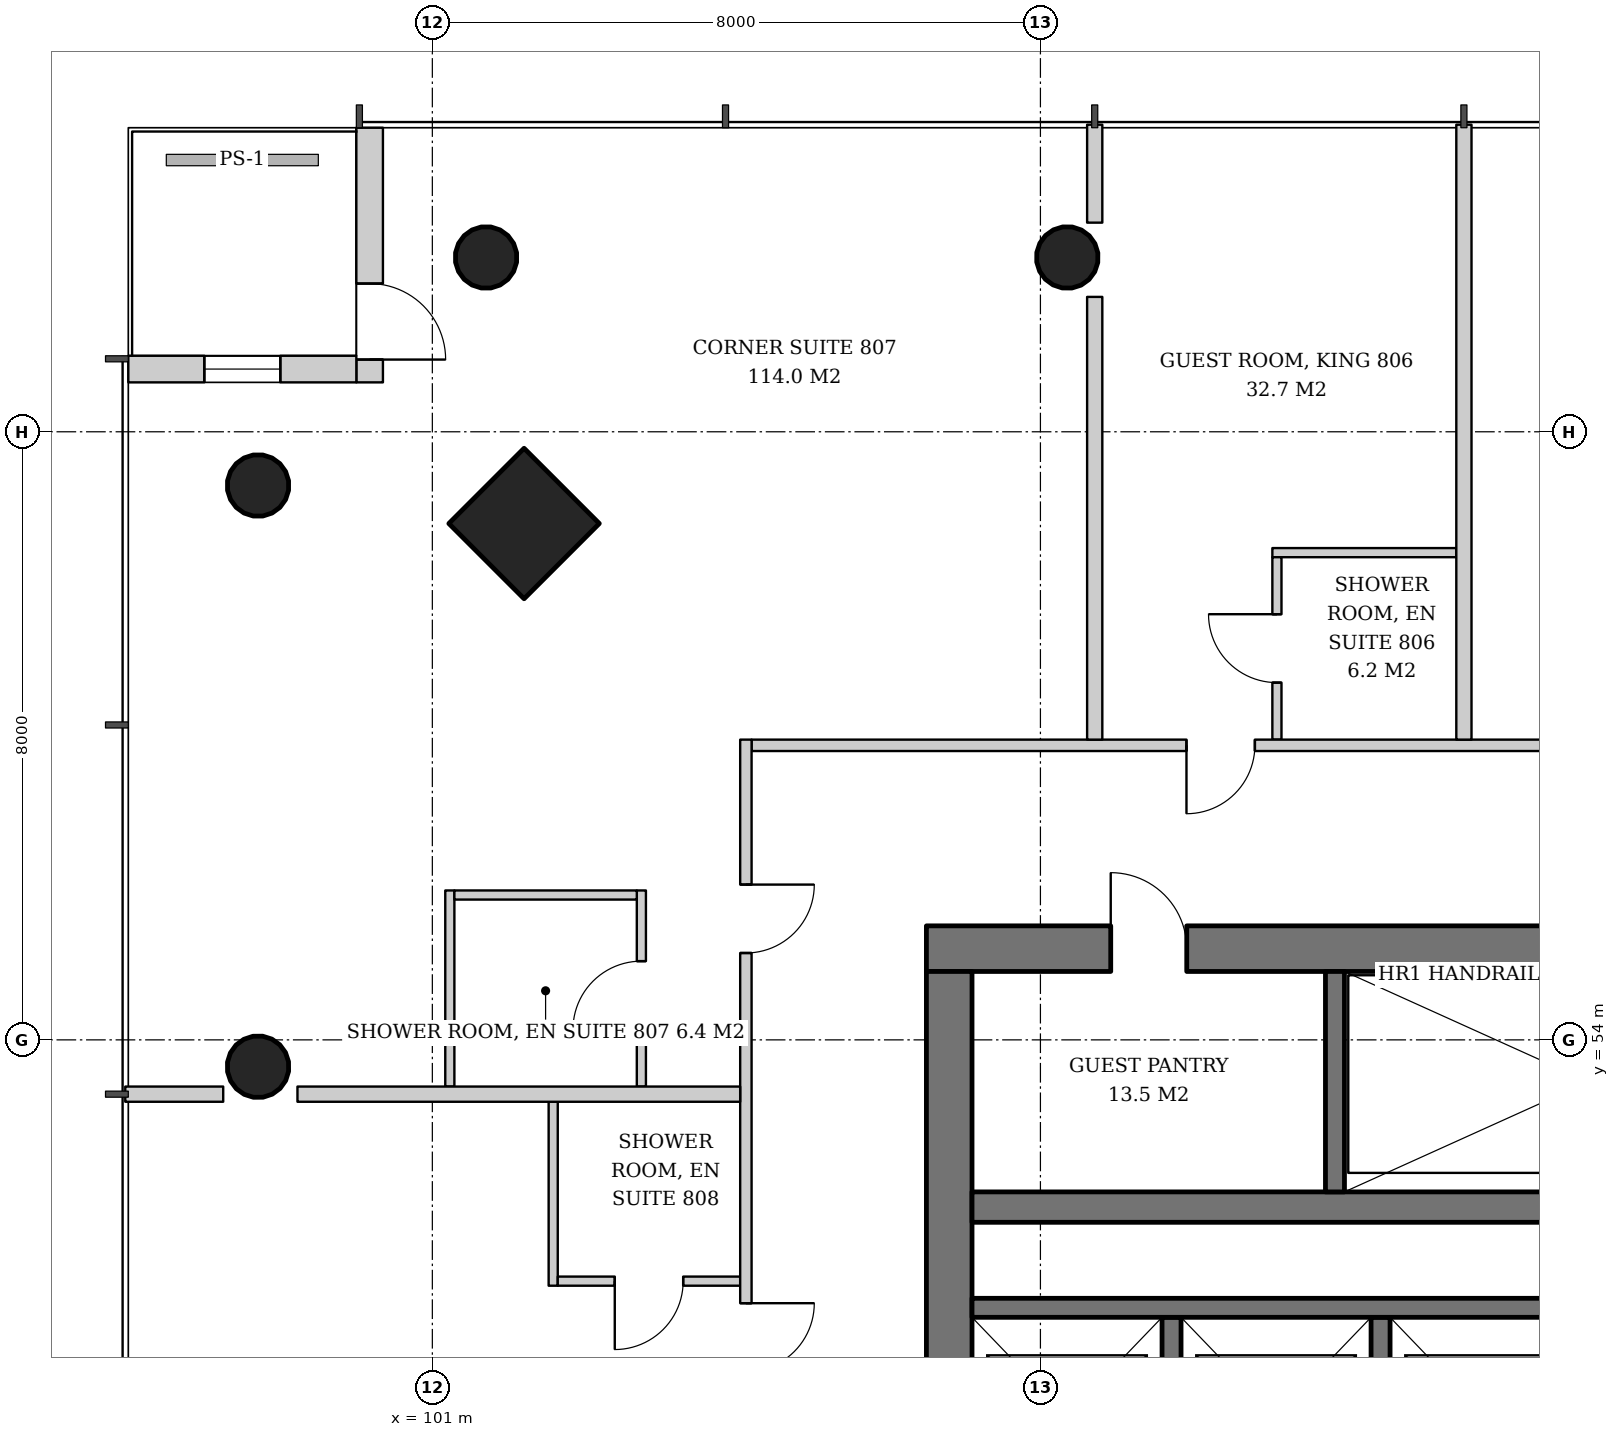
"""IFC4 building model, lengths in metres.
Left out: names, types, materials, properties, quantities, classifications, styles, units other than length and angle.
Written with IfcOpenShell. Run it as: python <this file> out.ifc"""

import sys

from ifc_helpers import new_model, si_unit, direction, frame, frame_2d, origin, origin_2d, place, context, subcontext, project, spatial, rectangle, hollow_circle, extrude, element, fill, save


model = new_model("IFC4")
c1 = context("Model", 3, precision=1e-05, world=origin(), true_north=direction((0.0, 1.0)))
c2 = subcontext(c1, "Body", "Model", "MODEL_VIEW")
j1 = project(units=[si_unit("LENGTHUNIT", "METRE"), si_unit("PLANEANGLEUNIT", "RADIAN")], contexts=[c1])
p1 = place(None, origin())
s1 = spatial("IfcSite", under=j1, at=p1, CompositionType="ELEMENT")
p2 = place(p1, origin())
s2 = spatial("IfcBuilding", under=s1, at=p2, CompositionType="ELEMENT")
p3 = place(p2, frame((0.0, 0.0, 36.2)))
s3 = spatial("IfcBuildingStorey", under=s2, at=p3, CompositionType="ELEMENT", Elevation=36.2)
p4 = place(p3, frame((102.155, 60.845, 0.0), z_axis=(0.042965756413, -0.042965756413, 0.998152236661), x_axis=(0.707106781187, 0.707106781187, 0.0)))
e1 = element("IfcColumn", 1, at=p4, inside=s3, PredefinedType="COLUMN", context=c2, shape_type="SweptSolid", body=[
    extrude(rectangle(XDim=1.4, YDim=1.4, at=origin_2d()), origin(), (0.0, 0.0, 1.0), 3.807),
])
p5 = place(p3, frame((101.655, 64.345, 0.0), z_axis=(0.042965756413, -0.042965756413, 0.998152236661), x_axis=(0.707106781187, 0.707106781187, 0.0)))
e2 = element("IfcColumn", 2, at=p5, inside=s3, PredefinedType="COLUMN", context=c2, shape_type="SweptSolid", body=[
    extrude(hollow_circle(Radius=0.406, WallThickness=0.03, at=origin_2d()), origin(), (0.0, 0.0, 1.0), 3.807),
])
p6 = place(p3, frame((109.328, 64.345, 0.0), z_axis=(0.021497765643, -0.042995531285, 0.998843946952), x_axis=(0.894427191, 0.4472135955, 0.0)))
e3 = element("IfcColumn", 3, at=p6, inside=s3, PredefinedType="COLUMN", context=c2, shape_type="SweptSolid", body=[
    extrude(hollow_circle(Radius=0.406, WallThickness=0.03, at=origin_2d()), origin(), (0.0, 0.0, 1.0), 3.804),
])
p7 = place(p3, frame((98.655, 61.345, 0.0), z_axis=(0.042965756413, -0.042965756413, 0.998152236661), x_axis=(0.707106781187, 0.707106781187, 0.0)))
e4 = element("IfcColumn", 4, at=p7, inside=s3, PredefinedType="COLUMN", context=c2, shape_type="SweptSolid", body=[
    extrude(hollow_circle(Radius=0.406, WallThickness=0.03, at=origin_2d()), origin(), (0.0, 0.0, 1.0), 3.807),
])
p8 = place(p3, frame((98.655, 53.672, 0.0), z_axis=(0.042995531285, -0.021497765643, 0.998843946952), x_axis=(0.4472135955, 0.894427191, 0.0)))
e5 = element("IfcColumn", 5, at=p8, inside=s3, PredefinedType="COLUMN", context=c2, shape_type="SweptSolid", body=[
    extrude(hollow_circle(Radius=0.406, WallThickness=0.03, at=origin_2d()), origin(), (0.0, 0.0, 1.0), 3.804),
])
p9 = place(p3, frame((107.5, 55.2, 0.0), z_axis=(0.0, 0.0, 1.0), x_axis=(1.0, 0.0, 0.0)))
e6 = element("IfcWall", 6, at=p9, inside=s3, PredefinedType="SHEAR", context=c2, shape_type="SweptSolid", body=[
    extrude(rectangle(XDim=19.0, YDim=0.6, at=frame_2d((9.5, 0.0))), origin(), (0.0, 0.0, 1.0), 3.8),
])
p10 = place(p9, frame((14.14, 0.0, 0.0)))
e7 = element("IfcOpeningElement", 7, at=p10, cuts=e6, PredefinedType="OPENING", context=c2, shape_type="SweptSolid", body=[
    extrude(rectangle(XDim=1.0, YDim=2.1, at=frame_2d((0.5, 1.05))), frame((0.0, 0.31, 0.0), z_axis=(0.0, -1.0, 0.0), x_axis=(1.0, 0.0, 0.0)), (0.0, 0.0, 1.0), 0.62),
])
p11 = place(p9, frame((2.425, 0.0, 0.0)))
e8 = element("IfcOpeningElement", 8, at=p11, cuts=e6, PredefinedType="OPENING", context=c2, shape_type="SweptSolid", body=[
    extrude(rectangle(XDim=1.0, YDim=2.1, at=frame_2d((0.5, 1.05))), frame((0.0, 0.31, 0.0), z_axis=(0.0, -1.0, 0.0), x_axis=(1.0, 0.0, 0.0)), (0.0, 0.0, 1.0), 0.62),
])
p12 = place(p3, frame((107.8, 37.1, 0.0), z_axis=(0.0, 0.0, 1.0), x_axis=(0.0, 1.0, 0.0)))
e9 = element("IfcWall", 9, at=p12, inside=s3, PredefinedType="SHEAR", context=c2, shape_type="SweptSolid", body=[
    extrude(rectangle(XDim=17.8, YDim=0.6, at=frame_2d((8.9, 0.0))), origin(), (0.0, 0.0, 1.0), 3.8),
])
p13 = place(p12, frame((8.0, 0.0, 0.0)))
e10 = element("IfcOpeningElement", 10, at=p13, cuts=e9, PredefinedType="OPENING", context=c2, shape_type="SweptSolid", body=[
    extrude(rectangle(XDim=1.8, YDim=2.4, at=frame_2d((0.9, 1.2))), frame((0.0, 0.31, 0.0), z_axis=(0.0, -1.0, 0.0), x_axis=(1.0, 0.0, 0.0)), (0.0, 0.0, 1.0), 0.62),
])
p14 = place(p3, frame((108.1, 51.8, 0.0), z_axis=(0.0, 0.0, 1.0), x_axis=(1.0, 0.0, 0.0)))
e11 = element("IfcWall", 11, at=p14, inside=s3, PredefinedType="SHEAR", context=c2, shape_type="SweptSolid", body=[
    extrude(rectangle(XDim=17.8, YDim=0.4, at=frame_2d((8.9, 0.0))), origin(), (0.0, 0.0, 1.0), 3.8),
])
p15 = place(p3, frame((100.175, 66.0, 0.0), z_axis=(0.0, 0.0, 1.0), x_axis=(0.0, -1.0, 0.0)))
e12 = element("IfcWall", 12, at=p15, inside=s3, PredefinedType="SOLIDWALL", context=c2, shape_type="SweptSolid", body=[
    extrude(rectangle(XDim=3.35, YDim=0.35, at=frame_2d((1.675, 0.0))), origin(), (0.0, 0.0, 1.0), 3.6),
])
p16 = place(p15, frame((2.05, 0.0, 0.0)))
e13 = element("IfcOpeningElement", 13, at=p16, cuts=e12, PredefinedType="OPENING", context=c2, shape_type="SweptSolid", body=[
    extrude(rectangle(XDim=1.0, YDim=2.4, at=frame_2d((0.5, 1.2))), frame((0.0, 0.185, 0.0), z_axis=(0.0, -1.0, 0.0), x_axis=(1.0, 0.0, 0.0)), (0.0, 0.0, 1.0), 0.37),
])
p17 = place(p3, frame((100.0, 62.825, 0.0), z_axis=(0.0, 0.0, 1.0), x_axis=(-1.0, 0.0, 0.0)))
e14 = element("IfcWall", 14, at=p17, inside=s3, PredefinedType="SOLIDWALL", context=c2, shape_type="SweptSolid", body=[
    extrude(rectangle(XDim=3.0, YDim=0.35, at=frame_2d((1.5, 0.0))), origin(), (0.0, 0.0, 1.0), 3.6),
])
p18 = place(p17, frame((1.0, 0.0, 0.9)))
e15 = element("IfcOpeningElement", 15, at=p18, cuts=e14, PredefinedType="OPENING", context=c2, shape_type="SweptSolid", body=[
    extrude(rectangle(XDim=1.0, YDim=2.4, at=frame_2d((0.5, 1.2))), frame((0.0, 0.185, 0.0), z_axis=(0.0, -1.0, 0.0), x_axis=(1.0, 0.0, 0.0)), (0.0, 0.0, 1.0), 0.37),
])
p19 = place(p3, frame((112.875, 52.0, 0.0), z_axis=(0.0, 0.0, 1.0), x_axis=(0.0, 1.0, 0.0)))
e16 = element("IfcWall", 16, at=p19, inside=s3, PredefinedType="SHEAR", context=c2, shape_type="SweptSolid", body=[
    extrude(rectangle(XDim=2.9, YDim=0.25, at=frame_2d((1.45, 0.0))), origin(), (0.0, 0.0, 1.0), 3.8),
])
for number, where, z_axis, x_axis in (
    (17, (110.725, 47.75, 0.0), (0.0, 0.0, 1.0), (0.0, 1.0, 0.0)),
    (18, (113.475, 47.75, 0.0), (0.0, 0.0, 1.0), (0.0, 1.0, 0.0)),
):
    element("IfcWall", number, at=place(p3, frame(where, z_axis=z_axis, x_axis=x_axis)), inside=s3, PredefinedType="SHEAR", context=c2, shape_type="SweptSolid", body=[
        extrude(rectangle(XDim=2.6, YDim=0.25, at=frame_2d((1.3, 0.0))), origin(), (0.0, 0.0, 1.0), 3.8),
    ])
p20 = place(p3, frame((108.1, 50.475, 0.0), z_axis=(0.0, 0.0, 1.0), x_axis=(1.0, 0.0, 0.0)))
e19 = element("IfcWall", 19, at=p20, inside=s3, PredefinedType="SHEAR", context=c2, shape_type="SweptSolid", body=[
    extrude(rectangle(XDim=11.0, YDim=0.25, at=frame_2d((5.5, 0.0))), origin(), (0.0, 0.0, 1.0), 3.8),
])
p21 = place(p3, frame((114.471, 60.41, 0.0), z_axis=(0.0, 0.0, 1.0), x_axis=(-1.0, 0.0, 0.0)))
e20 = element("IfcWall", 20, at=p21, inside=s3, PredefinedType="PARTITIONING", context=c2, shape_type="SweptSolid", body=[
    extrude(rectangle(XDim=2.42, YDim=0.12, at=frame_2d((1.21, 0.0))), origin(), (0.0, 0.0, 1.0), 2.847),
])
p22 = place(p3, frame((112.111, 57.95, 0.0), z_axis=(0.0, 0.0, 1.0), x_axis=(0.0, 1.0, 0.0)))
e21 = element("IfcWall", 21, at=p22, inside=s3, PredefinedType="PARTITIONING", context=c2, shape_type="SweptSolid", body=[
    extrude(rectangle(XDim=2.4, YDim=0.12, at=frame_2d((1.2, 0.0))), origin(), (0.0, 0.0, 1.0), 3.6),
])
p23 = place(p22, frame((0.75, 0.0, 0.0)))
e22 = element("IfcOpeningElement", 22, at=p23, cuts=e21, PredefinedType="OPENING", context=c2, shape_type="SweptSolid", body=[
    extrude(rectangle(XDim=0.9, YDim=2.1, at=frame_2d((0.45, 1.05))), frame((0.0, 0.07, 0.0), z_axis=(0.0, -1.0, 0.0), x_axis=(1.0, 0.0, 0.0)), (0.0, 0.0, 1.0), 0.14),
])
p24 = place(p3, frame((128.95, 57.875, 0.0), z_axis=(0.0, 0.0, 1.0), x_axis=(-1.0, 0.0, 0.0)))
e23 = element("IfcWall", 23, at=p24, inside=s3, PredefinedType="PARTITIONING", context=c2, shape_type="SweptSolid", body=[
    extrude(rectangle(XDim=23.75, YDim=0.15, at=frame_2d((11.875, 0.0))), origin(), (0.0, 0.0, 1.0), 2.8),
])
p25 = place(p24, frame((1.907, 0.0, 0.0)))
e24 = element("IfcOpeningElement", 24, at=p25, cuts=e23, PredefinedType="OPENING", context=c2, shape_type="SweptSolid", body=[
    extrude(rectangle(XDim=0.9, YDim=2.1, at=frame_2d((0.45, 1.05))), frame((0.0, 0.085, 0.0), z_axis=(0.0, -1.0, 0.0), x_axis=(1.0, 0.0, 0.0)), (0.0, 0.0, 1.0), 0.17),
])
p26 = place(p24, frame((7.414, 0.0, 0.0)))
e25 = element("IfcOpeningElement", 25, at=p26, cuts=e23, PredefinedType="OPENING", context=c2, shape_type="SweptSolid", body=[
    extrude(rectangle(XDim=0.9, YDim=2.1, at=frame_2d((0.45, 1.05))), frame((0.0, 0.085, 0.0), z_axis=(0.0, -1.0, 0.0), x_axis=(1.0, 0.0, 0.0)), (0.0, 0.0, 1.0), 0.17),
])
p27 = place(p24, frame((17.129, 0.0, 0.0)))
e26 = element("IfcOpeningElement", 26, at=p27, cuts=e23, PredefinedType="OPENING", context=c2, shape_type="SweptSolid", body=[
    extrude(rectangle(XDim=0.9, YDim=2.1, at=frame_2d((0.45, 1.05))), frame((0.0, 0.085, 0.0), z_axis=(0.0, -1.0, 0.0), x_axis=(1.0, 0.0, 0.0)), (0.0, 0.0, 1.0), 0.17),
])
p28 = place(p3, frame((114.572, 57.95, 0.0), z_axis=(0.0, 0.0, 1.0), x_axis=(0.0, 1.0, 0.0)))
e27 = element("IfcWall", 27, at=p28, inside=s3, PredefinedType="PARTITIONING", context=c2, shape_type="SweptSolid", body=[
    extrude(rectangle(XDim=8.09, YDim=0.2, at=frame_2d((4.045, 0.0))), origin(), (0.0, 0.0, 1.0), 2.847),
])
p29 = place(p3, frame((109.714, 57.95, 0.0), z_axis=(0.0, 0.0, 1.0), x_axis=(0.0, 1.0, 0.0)))
e28 = element("IfcWall", 28, at=p29, inside=s3, PredefinedType="PARTITIONING", context=c2, shape_type="SweptSolid", body=[
    extrude(rectangle(XDim=5.824, YDim=0.2, at=frame_2d((2.912, 0.0))), origin(), (0.0, 0.0, 1.0), 3.6),
])
p30 = place(p3, frame((109.714, 64.751, 0.0), z_axis=(0.0, 0.0, 1.0), x_axis=(0.0, 1.0, 0.0)))
e29 = element("IfcWall", 29, at=p30, inside=s3, PredefinedType="PARTITIONING", context=c2, shape_type="SweptSolid", body=[
    extrude(rectangle(XDim=1.289, YDim=0.2, at=frame_2d((0.645, 0.0))), origin(), (0.0, 0.0, 1.0), 3.6),
])
p31 = place(p3, frame((103.75, 53.386, 0.0), z_axis=(0.0, 0.0, 1.0), x_axis=(0.0, 1.0, 0.0)))
e30 = element("IfcWall", 30, at=p31, inside=s3, PredefinedType="PARTITIONING", context=c2, shape_type="SweptSolid", body=[
    extrude(rectangle(XDim=2.58, YDim=0.12, at=frame_2d((1.29, 0.0))), origin(), (0.0, 0.0, 1.0), 2.8),
])
p32 = place(p31, frame((0.75, 0.0, 0.0)))
e31 = element("IfcOpeningElement", 31, at=p32, cuts=e30, PredefinedType="OPENING", context=c2, shape_type="SweptSolid", body=[
    extrude(rectangle(XDim=0.9, YDim=2.1, at=frame_2d((0.45, 1.05))), frame((0.0, 0.07, 0.0), z_axis=(0.0, -1.0, 0.0), x_axis=(1.0, 0.0, 0.0)), (0.0, 0.0, 1.0), 0.14),
])
p33 = place(p3, frame((101.23, 53.386, 0.0), z_axis=(0.0, 0.0, 1.0), x_axis=(0.0, 1.0, 0.0)))
e32 = element("IfcWall", 32, at=p33, inside=s3, PredefinedType="PARTITIONING", context=c2, shape_type="SweptSolid", body=[
    extrude(rectangle(XDim=2.58, YDim=0.12, at=frame_2d((1.29, 0.0))), origin(), (0.0, 0.0, 1.0), 2.8),
])
p34 = place(p3, frame((103.69, 55.906, 0.0), z_axis=(0.0, 0.0, 1.0), x_axis=(-1.0, 0.0, 0.0)))
e33 = element("IfcWall", 33, at=p34, inside=s3, PredefinedType="PARTITIONING", context=c2, shape_type="SweptSolid", body=[
    extrude(rectangle(XDim=2.4, YDim=0.12, at=frame_2d((1.2, 0.0))), origin(), (0.0, 0.0, 1.0), 2.847),
])
p35 = place(p3, frame((102.59, 53.186, 0.0), z_axis=(0.0, 0.0, 1.0), x_axis=(0.0, -1.0, 0.0)))
e34 = element("IfcWall", 34, at=p35, inside=s3, PredefinedType="PARTITIONING", context=c2, shape_type="SweptSolid", body=[
    extrude(rectangle(XDim=2.42, YDim=0.12, at=frame_2d((1.21, 0.0))), origin(), (0.0, 0.0, 1.0), 2.847),
])
p36 = place(p3, frame((105.05, 50.826, 0.0), z_axis=(0.0, 0.0, 1.0), x_axis=(-1.0, 0.0, 0.0)))
e35 = element("IfcWall", 35, at=p36, inside=s3, PredefinedType="PARTITIONING", context=c2, shape_type="SweptSolid", body=[
    extrude(rectangle(XDim=2.4, YDim=0.12, at=frame_2d((1.2, 0.0))), origin(), (0.0, 0.0, 1.0), 3.6),
])
p37 = place(p36, frame((0.75, 0.0, 0.0)))
e36 = element("IfcOpeningElement", 36, at=p37, cuts=e35, PredefinedType="OPENING", context=c2, shape_type="SweptSolid", body=[
    extrude(rectangle(XDim=0.9, YDim=2.1, at=frame_2d((0.45, 1.05))), frame((0.0, 0.07, 0.0), z_axis=(0.0, -1.0, 0.0), x_axis=(1.0, 0.0, 0.0)), (0.0, 0.0, 1.0), 0.14),
])
p38 = place(p3, frame((105.125, 57.95, 0.0), z_axis=(0.0, 0.0, 1.0), x_axis=(0.0, -1.0, 0.0)))
e37 = element("IfcWall", 37, at=p38, inside=s3, PredefinedType="PARTITIONING", context=c2, shape_type="SweptSolid", body=[
    extrude(rectangle(XDim=23.75, YDim=0.15, at=frame_2d((11.875, 0.0))), origin(), (0.0, 0.0, 1.0), 2.8),
])
p39 = place(p38, frame((1.907, 0.0, 0.0)))
e38 = element("IfcOpeningElement", 38, at=p39, cuts=e37, PredefinedType="OPENING", context=c2, shape_type="SweptSolid", body=[
    extrude(rectangle(XDim=0.9, YDim=2.1, at=frame_2d((0.45, 1.05))), frame((0.0, 0.085, 0.0), z_axis=(0.0, -1.0, 0.0), x_axis=(1.0, 0.0, 0.0)), (0.0, 0.0, 1.0), 0.17),
])
p40 = place(p38, frame((7.414, 0.0, 0.0)))
e39 = element("IfcOpeningElement", 39, at=p40, cuts=e37, PredefinedType="OPENING", context=c2, shape_type="SweptSolid", body=[
    extrude(rectangle(XDim=0.9, YDim=2.1, at=frame_2d((0.45, 1.05))), frame((0.0, 0.085, 0.0), z_axis=(0.0, -1.0, 0.0), x_axis=(1.0, 0.0, 0.0)), (0.0, 0.0, 1.0), 0.17),
])
p41 = place(p38, frame((17.079, 0.0, 0.0)))
e40 = element("IfcOpeningElement", 40, at=p41, cuts=e37, PredefinedType="OPENING", context=c2, shape_type="SweptSolid", body=[
    extrude(rectangle(XDim=1.0, YDim=2.1, at=frame_2d((0.5, 1.05))), frame((0.0, 0.085, 0.0), z_axis=(0.0, -1.0, 0.0), x_axis=(1.0, 0.0, 0.0)), (0.0, 0.0, 1.0), 0.17),
])
p42 = place(p3, frame((105.05, 53.286, 0.0), z_axis=(0.0, 0.0, 1.0), x_axis=(-1.0, 0.0, 0.0)))
e41 = element("IfcWall", 41, at=p42, inside=s3, PredefinedType="PARTITIONING", context=c2, shape_type="SweptSolid", body=[
    extrude(rectangle(XDim=5.824, YDim=0.2, at=frame_2d((2.912, 0.0))), origin(), (0.0, 0.0, 1.0), 3.6),
])
p43 = place(p3, frame((98.249, 53.286, 0.0), z_axis=(0.0, 0.0, 1.0), x_axis=(-1.0, 0.0, 0.0)))
e42 = element("IfcWall", 42, at=p43, inside=s3, PredefinedType="PARTITIONING", context=c2, shape_type="SweptSolid", body=[
    extrude(rectangle(XDim=1.289, YDim=0.2, at=frame_2d((0.645, 0.0))), origin(), (0.0, 0.0, 1.0), 3.6),
])
p44 = place(p16, origin())
e43 = element("IfcDoor", 43, at=p44, inside=s3, OperationType="SINGLE_SWING_RIGHT", PredefinedType="DOOR", context=c2, shape_type="SweptSolid", body=[
    extrude(rectangle(XDim=1.0, YDim=2.4, at=frame_2d((0.5, 1.2))), frame((0.0, 0.025, 0.0), z_axis=(0.0, -1.0, 0.0), x_axis=(1.0, 0.0, 0.0)), (0.0, 0.0, 1.0), 0.05),
])
fill(e13, e43)
p45 = place(p18, origin())
e44 = element("IfcWindow", 44, at=p45, inside=s3, PartitioningType="SINGLE_PANEL", PredefinedType="WINDOW", context=c2, shape_type="SweptSolid", body=[
    extrude(rectangle(XDim=1.0, YDim=2.4, at=frame_2d((0.5, 1.2))), frame((0.0, 0.03, 0.0), z_axis=(0.0, -1.0, 0.0), x_axis=(1.0, 0.0, 0.0)), (0.0, 0.0, 1.0), 0.06),
])
fill(e15, e44)
p46 = place(p11, origin())
e45 = element("IfcDoor", 45, at=p46, inside=s3, OperationType="SINGLE_SWING_LEFT", PredefinedType="DOOR", context=c2, shape_type="SweptSolid", body=[
    extrude(rectangle(XDim=1.0, YDim=2.1, at=frame_2d((0.5, 1.05))), frame((0.0, -0.24, 0.0), z_axis=(0.0, -1.0, 0.0), x_axis=(1.0, 0.0, 0.0)), (0.0, 0.0, 1.0), 0.05),
])
fill(e8, e45)
p47 = place(p23, origin())
e46 = element("IfcDoor", 46, at=p47, inside=s3, OperationType="SINGLE_SWING_RIGHT", PredefinedType="DOOR", context=c2, shape_type="SweptSolid", body=[
    extrude(rectangle(XDim=0.9, YDim=2.1, at=frame_2d((0.45, 1.05))), frame((0.0, 0.025, 0.0), z_axis=(0.0, -1.0, 0.0), x_axis=(1.0, 0.0, 0.0)), (0.0, 0.0, 1.0), 0.05),
])
fill(e22, e46)
p48 = place(p27, origin())
e47 = element("IfcDoor", 47, at=p48, inside=s3, OperationType="SINGLE_SWING_RIGHT", PredefinedType="DOOR", context=c2, shape_type="SweptSolid", body=[
    extrude(rectangle(XDim=0.9, YDim=2.1, at=frame_2d((0.45, 1.05))), frame((0.0, 0.025, 0.0), z_axis=(0.0, -1.0, 0.0), x_axis=(1.0, 0.0, 0.0)), (0.0, 0.0, 1.0), 0.05),
])
fill(e26, e47)
p49 = place(p32, origin())
e48 = element("IfcDoor", 48, at=p49, inside=s3, OperationType="SINGLE_SWING_LEFT", PredefinedType="DOOR", context=c2, shape_type="SweptSolid", body=[
    extrude(rectangle(XDim=0.9, YDim=2.1, at=frame_2d((0.45, 1.05))), frame((0.0, 0.025, 0.0), z_axis=(0.0, -1.0, 0.0), x_axis=(1.0, 0.0, 0.0)), (0.0, 0.0, 1.0), 0.05),
])
fill(e31, e48)
p50 = place(p37, origin())
e49 = element("IfcDoor", 49, at=p50, inside=s3, OperationType="SINGLE_SWING_RIGHT", PredefinedType="DOOR", context=c2, shape_type="SweptSolid", body=[
    extrude(rectangle(XDim=0.9, YDim=2.1, at=frame_2d((0.45, 1.05))), frame((0.0, 0.025, 0.0), z_axis=(0.0, -1.0, 0.0), x_axis=(1.0, 0.0, 0.0)), (0.0, 0.0, 1.0), 0.05),
])
fill(e36, e49)
p51 = place(p39, origin())
e50 = element("IfcDoor", 50, at=p51, inside=s3, OperationType="SINGLE_SWING_LEFT", PredefinedType="DOOR", context=c2, shape_type="SweptSolid", body=[
    extrude(rectangle(XDim=0.9, YDim=2.1, at=frame_2d((0.45, 1.05))), frame((0.0, 0.025, 0.0), z_axis=(0.0, -1.0, 0.0), x_axis=(1.0, 0.0, 0.0)), (0.0, 0.0, 1.0), 0.05),
])
fill(e38, e50)
p52 = place(p40, origin())
e51 = element("IfcDoor", 51, at=p52, inside=s3, OperationType="SINGLE_SWING_LEFT", PredefinedType="DOOR", context=c2, shape_type="SweptSolid", body=[
    extrude(rectangle(XDim=0.9, YDim=2.1, at=frame_2d((0.45, 1.05))), frame((0.0, 0.025, 0.0), z_axis=(0.0, -1.0, 0.0), x_axis=(1.0, 0.0, 0.0)), (0.0, 0.0, 1.0), 0.05),
])
fill(e39, e51)
save(model, sys.argv[1])
